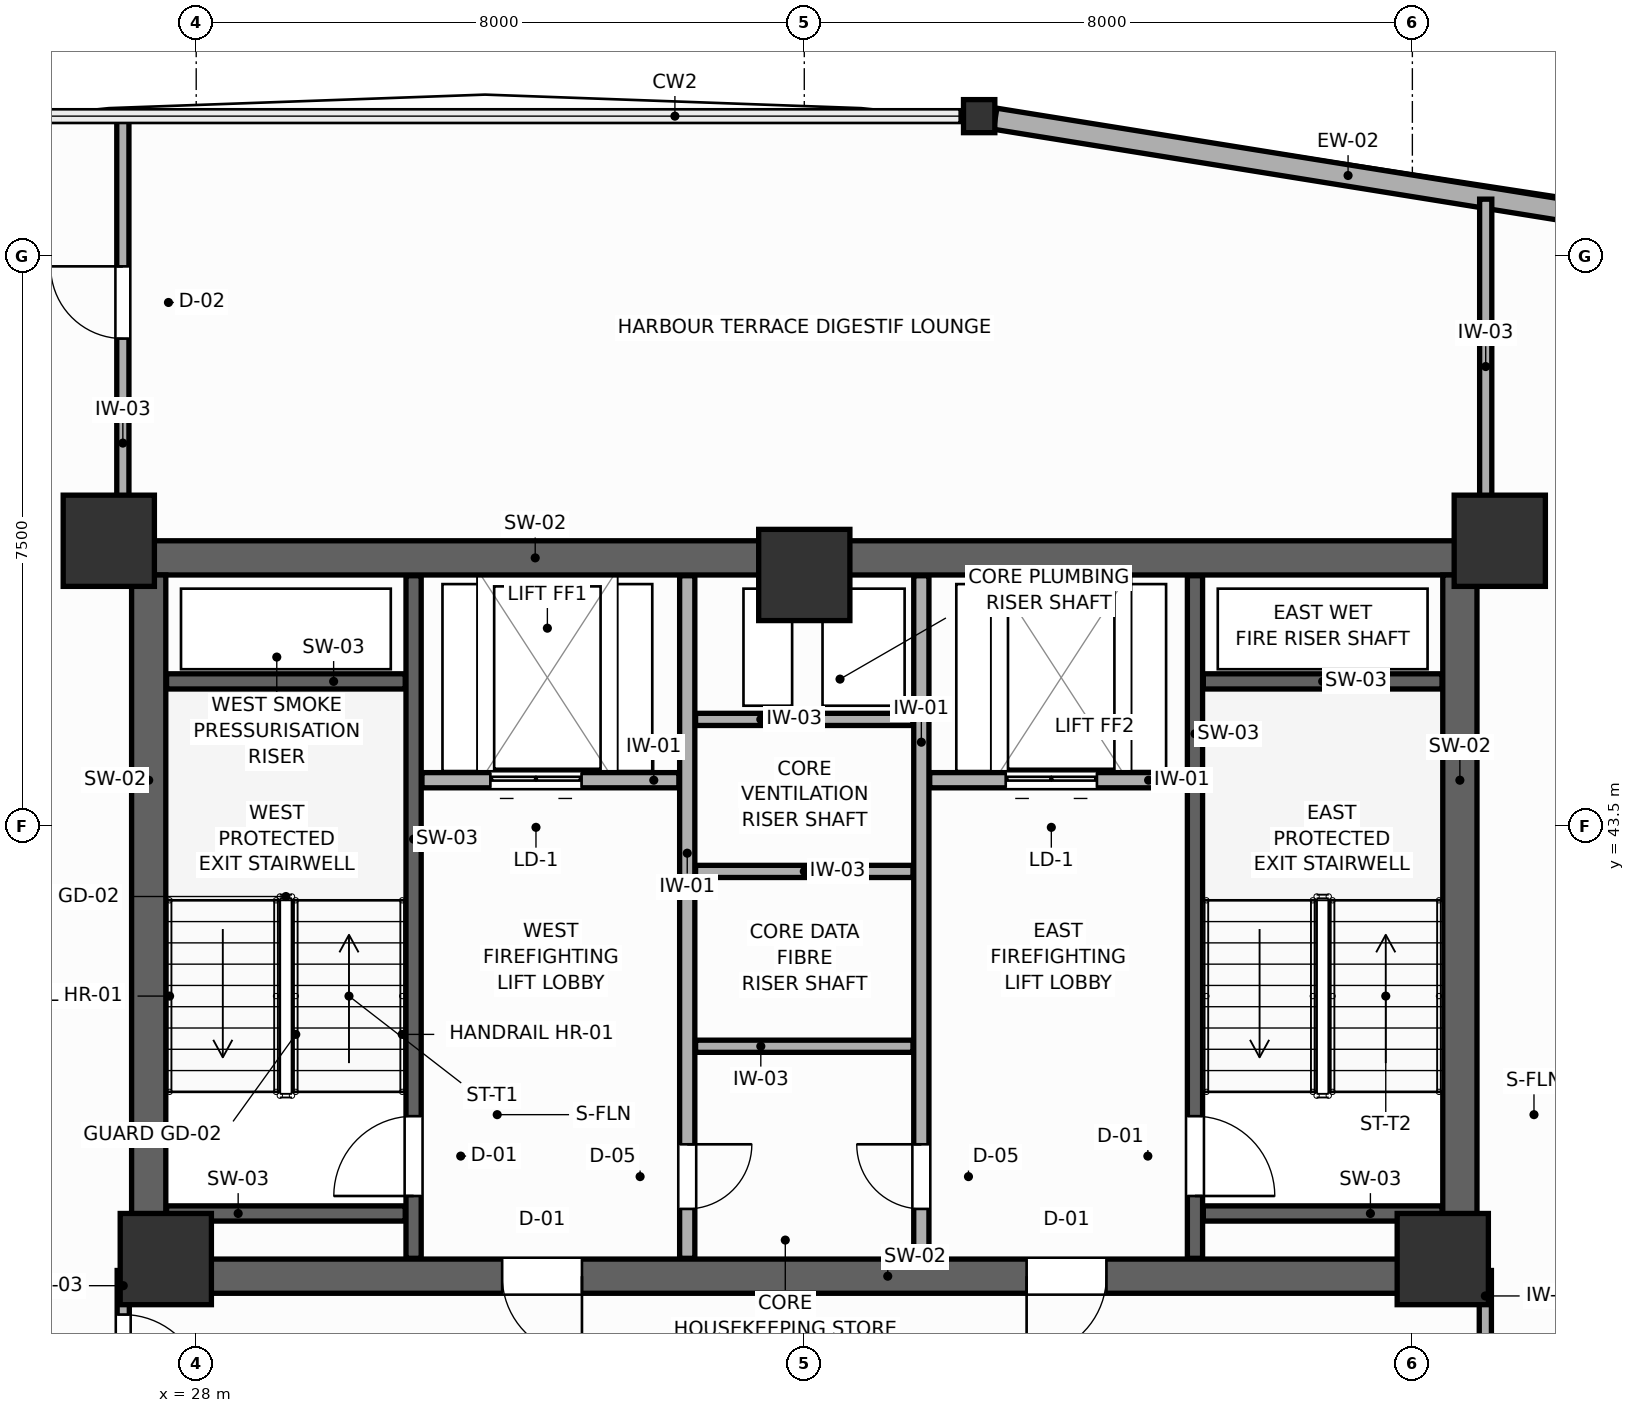
"""IFC4 building model, lengths in metres.
Left out: names, types, materials, properties, quantities, classifications, styles, units other than length and angle.
Written with IfcOpenShell. Run it as: python <this file> out.ifc"""

import sys

from ifc_helpers import new_model, si_unit, direction, frame, frame_2d, origin, origin_2d, place, context, subcontext, project, spatial, rectangle, i_section, extrude, source, transform, mapped, element, fill, save


model = new_model("IFC4")
c1 = context("Model", 3, precision=1e-05, world=origin(), true_north=direction((0.0, 1.0)))
c2 = subcontext(c1, "Body", "Model", "MODEL_VIEW")
j1 = project(units=[si_unit("LENGTHUNIT", "METRE"), si_unit("PLANEANGLEUNIT", "RADIAN")], contexts=[c1])
p1 = place(None, origin())
s1 = spatial("IfcSite", under=j1, at=p1, CompositionType="ELEMENT")
p2 = place(p1, origin())
s2 = spatial("IfcBuilding", under=s1, at=p2, CompositionType="ELEMENT")
p3 = place(p2, frame((0.0, 0.0, 147.0)))
s3 = spatial("IfcBuildingStorey", under=s2, at=p3, CompositionType="ELEMENT", Elevation=147.0)
p4 = place(p3, frame((27.15, 47.025, 0.0), z_axis=(0.0, 0.0, 1.0), x_axis=(1.0, 0.0, 0.0)))
e1 = element("IfcWall", 1, at=p4, inside=s3, PredefinedType="SHEAR", context=c2, shape_type="SweptSolid", body=[
    extrude(rectangle(XDim=17.7, YDim=0.45, at=frame_2d((8.85, 0.0))), origin(), (0.0, 0.0, 1.0), 3.6),
])
p5 = place(p3, frame((27.15, 37.575, 0.0), z_axis=(0.0, 0.0, 1.0), x_axis=(1.0, 0.0, 0.0)))
e2 = element("IfcWall", 2, at=p5, inside=s3, PredefinedType="SHEAR", context=c2, shape_type="SweptSolid", body=[
    extrude(rectangle(XDim=17.7, YDim=0.45, at=frame_2d((8.85, 0.0))), origin(), (0.0, 0.0, 1.0), 3.6),
])
p6 = place(p5, frame((4.875, 0.0, 0.0)))
e3 = element("IfcOpeningElement", 3, at=p6, cuts=e2, PredefinedType="OPENING", context=c2, shape_type="SweptSolid", body=[
    extrude(rectangle(XDim=1.05, YDim=2.1, at=frame_2d((0.525, 1.05))), frame((0.0, 0.235, 0.0), z_axis=(0.0, -1.0, 0.0), x_axis=(1.0, 0.0, 0.0)), (0.0, 0.0, 1.0), 0.47),
])
p7 = place(p5, frame((11.775, 0.0, 0.0)))
e4 = element("IfcOpeningElement", 4, at=p7, cuts=e2, PredefinedType="OPENING", context=c2, shape_type="SweptSolid", body=[
    extrude(rectangle(XDim=1.05, YDim=2.1, at=frame_2d((0.525, 1.05))), frame((0.0, 0.235, 0.0), z_axis=(0.0, -1.0, 0.0), x_axis=(1.0, 0.0, 0.0)), (0.0, 0.0, 1.0), 0.47),
])
for number, where, z_axis, x_axis in (
    (5, (27.375, 37.8, 0.0), (0.0, 0.0, 1.0), (0.0, 1.0, 0.0)),
    (6, (44.625, 37.8, 0.0), (0.0, 0.0, 1.0), (0.0, 1.0, 0.0)),
):
    element("IfcWall", number, at=place(p3, frame(where, z_axis=z_axis, x_axis=x_axis)), inside=s3, PredefinedType="SHEAR", context=c2, shape_type="SweptSolid", body=[
        extrude(rectangle(XDim=9.0, YDim=0.45, at=frame_2d((4.5, 0.0))), origin(), (0.0, 0.0, 1.0), 3.6),
    ])
m1 = source(origin(), c2, "Body", "SweptSolid", [
    extrude(rectangle(XDim=1.2, YDim=1.2, at=origin_2d()), origin(), (0.0, 0.0, 1.0), 3.6),
])
for number, where, z_axis, x_axis in (
    (7, (26.85, 47.25, 0.0), (0.0, 0.0, 1.0), (1.0, 0.0, 0.0)),
    (8, (45.15, 47.25, 0.0), (0.0, 0.0, 1.0), (1.0, 0.0, 0.0)),
    (9, (27.6, 37.8, 0.0), (0.0, 0.0, 1.0), (1.0, 0.0, 0.0)),
    (10, (44.4, 37.8, 0.0), (0.0, 0.0, 1.0), (1.0, 0.0, 0.0)),
    (11, (36.0, 46.8, 0.0), (0.0, 0.0, 1.0), (1.0, 0.0, 0.0)),
):
    element("IfcColumn", number, at=place(p3, frame(where, z_axis=z_axis, x_axis=x_axis)), inside=s3, PredefinedType="COLUMN", context=c2, shape_type="MappedRepresentation", body=[
        mapped(m1, transform((0.0, 0.0, 0.0), scale=1.0)),
    ])
m2 = source(origin(), c2, "Body", "SweptSolid", [
    extrude(i_section(OverallWidth=0.412, OverallDepth=0.435, WebThickness=0.033, FlangeThickness=0.053, FilletRadius=0.015, at=origin_2d()), origin(), (0.0, 0.0, 1.0), 3.6),
])
p8 = place(p3, frame((38.301, 52.836, 0.0), z_axis=(0.0, 0.0, 1.0), x_axis=(1.0, 0.0, 0.0)))
e12 = element("IfcColumn", 12, at=p8, inside=s3, PredefinedType="COLUMN", context=c2, shape_type="MappedRepresentation", body=[
    mapped(m2, transform((0.0, 0.0, 0.0), scale=1.0)),
])
p9 = place(p3, frame((53.07, 50.46, 0.0), z_axis=(0.0, 0.0, 1.0), x_axis=(-0.987303259595, 0.158846698404, 0.0)))
e13 = element("IfcWall", 13, at=p9, inside=s3, PredefinedType="SOLIDWALL", context=c2, shape_type="SweptSolid", body=[
    extrude(rectangle(XDim=14.746, YDim=0.28, at=frame_2d((7.373, 0.0))), origin(), (0.0, 0.0, 1.0), 3.0),
])
p10 = place(p9, frame((3.461, 0.0, 0.75)))
e14 = element("IfcOpeningElement", 14, at=p10, cuts=e13, PredefinedType="OPENING", context=c2, shape_type="SweptSolid", body=[
    extrude(rectangle(XDim=1.7, YDim=1.75, at=frame_2d((0.85, 0.875))), frame((0.0, 0.15, 0.0), z_axis=(0.0, -1.0, 0.0), x_axis=(1.0, 0.0, 0.0)), (0.0, 0.0, 1.0), 0.3),
])
p11 = place(p3, frame((30.86, 37.81, 0.0), z_axis=(0.0, 0.0, 1.0), x_axis=(0.0, 1.0, 0.0)))
e15 = element("IfcWall", 15, at=p11, inside=s3, PredefinedType="SHEAR", context=c2, shape_type="SweptSolid", body=[
    extrude(rectangle(XDim=8.98, YDim=0.2, at=frame_2d((4.49, 0.0))), origin(), (0.0, 0.0, 1.0), 3.6),
])
p12 = place(p11, frame((0.82, 0.0, 0.0)))
e16 = element("IfcOpeningElement", 16, at=p12, cuts=e15, PredefinedType="OPENING", context=c2, shape_type="SweptSolid", body=[
    extrude(rectangle(XDim=1.05, YDim=2.1, at=frame_2d((0.525, 1.05))), frame((0.0, 0.11, 0.0), z_axis=(0.0, -1.0, 0.0), x_axis=(1.0, 0.0, 0.0)), (0.0, 0.0, 1.0), 0.22),
])
for number, where, z_axis, x_axis in (
    (17, (27.61, 45.4, 0.0), (0.0, 0.0, 1.0), (1.0, 0.0, 0.0)),
    (18, (27.61, 38.4, 0.0), (0.0, 0.0, 1.0), (1.0, 0.0, 0.0)),
):
    element("IfcWall", number, at=place(p3, frame(where, z_axis=z_axis, x_axis=x_axis)), inside=s3, PredefinedType="SHEAR", context=c2, shape_type="SweptSolid", body=[
        extrude(rectangle(XDim=3.14, YDim=0.2, at=frame_2d((1.57, 0.0))), origin(), (0.0, 0.0, 1.0), 3.6),
    ])
p13 = place(p3, frame((41.14, 37.81, 0.0), z_axis=(0.0, 0.0, 1.0), x_axis=(0.0, 1.0, 0.0)))
e19 = element("IfcWall", 19, at=p13, inside=s3, PredefinedType="SHEAR", context=c2, shape_type="SweptSolid", body=[
    extrude(rectangle(XDim=8.98, YDim=0.2, at=frame_2d((4.49, 0.0))), origin(), (0.0, 0.0, 1.0), 3.6),
])
p14 = place(p13, frame((0.82, 0.0, 0.0)))
e20 = element("IfcOpeningElement", 20, at=p14, cuts=e19, PredefinedType="OPENING", context=c2, shape_type="SweptSolid", body=[
    extrude(rectangle(XDim=1.05, YDim=2.1, at=frame_2d((0.525, 1.05))), frame((0.0, 0.11, 0.0), z_axis=(0.0, -1.0, 0.0), x_axis=(1.0, 0.0, 0.0)), (0.0, 0.0, 1.0), 0.22),
])
for number, where, z_axis, x_axis in (
    (21, (41.25, 45.4, 0.0), (0.0, 0.0, 1.0), (1.0, 0.0, 0.0)),
    (22, (41.25, 38.4, 0.0), (0.0, 0.0, 1.0), (1.0, 0.0, 0.0)),
):
    element("IfcWall", number, at=place(p3, frame(where, z_axis=z_axis, x_axis=x_axis)), inside=s3, PredefinedType="SHEAR", context=c2, shape_type="SweptSolid", body=[
        extrude(rectangle(XDim=3.14, YDim=0.2, at=frame_2d((1.57, 0.0))), origin(), (0.0, 0.0, 1.0), 3.6),
    ])
p15 = place(p3, frame((30.97, 44.1, 0.0), z_axis=(0.0, 0.0, 1.0), x_axis=(1.0, 0.0, 0.0)))
e23 = element("IfcWall", 23, at=p15, inside=s3, PredefinedType="PARTITIONING", context=c2, shape_type="SweptSolid", body=[
    extrude(rectangle(XDim=3.38, YDim=0.2, at=frame_2d((1.69, 0.0))), origin(), (0.0, 0.0, 1.0), 3.4),
])
p16 = place(p15, frame((0.9, 0.0, 0.0)))
e24 = element("IfcOpeningElement", 24, at=p16, cuts=e23, PredefinedType="OPENING", context=c2, shape_type="SweptSolid", body=[
    extrude(rectangle(XDim=1.2, YDim=2.1, at=frame_2d((0.6, 1.05))), frame((0.0, 0.11, 0.0), z_axis=(0.0, -1.0, 0.0), x_axis=(1.0, 0.0, 0.0)), (0.0, 0.0, 1.0), 0.22),
])
p17 = place(p3, frame((37.65, 44.1, 0.0), z_axis=(0.0, 0.0, 1.0), x_axis=(1.0, 0.0, 0.0)))
e25 = element("IfcWall", 25, at=p17, inside=s3, PredefinedType="PARTITIONING", context=c2, shape_type="SweptSolid", body=[
    extrude(rectangle(XDim=3.38, YDim=0.2, at=frame_2d((1.69, 0.0))), origin(), (0.0, 0.0, 1.0), 3.4),
])
p18 = place(p17, frame((1.0, 0.0, 0.0)))
e26 = element("IfcOpeningElement", 26, at=p18, cuts=e25, PredefinedType="OPENING", context=c2, shape_type="SweptSolid", body=[
    extrude(rectangle(XDim=1.2, YDim=2.1, at=frame_2d((0.6, 1.05))), frame((0.0, 0.11, 0.0), z_axis=(0.0, -1.0, 0.0), x_axis=(1.0, 0.0, 0.0)), (0.0, 0.0, 1.0), 0.22),
])
p19 = place(p3, frame((34.46, 37.81, 0.0), z_axis=(0.0, 0.0, 1.0), x_axis=(0.0, 1.0, 0.0)))
e27 = element("IfcWall", 27, at=p19, inside=s3, PredefinedType="PARTITIONING", context=c2, shape_type="SweptSolid", body=[
    extrude(rectangle(XDim=8.98, YDim=0.2, at=frame_2d((4.49, 0.0))), origin(), (0.0, 0.0, 1.0), 3.4),
])
p20 = place(p19, frame((0.65, 0.0, 0.0)))
e28 = element("IfcOpeningElement", 28, at=p20, cuts=e27, PredefinedType="OPENING", context=c2, shape_type="SweptSolid", body=[
    extrude(rectangle(XDim=0.85, YDim=2.05, at=frame_2d((0.425, 1.025))), frame((0.0, 0.11, 0.0), z_axis=(0.0, -1.0, 0.0), x_axis=(1.0, 0.0, 0.0)), (0.0, 0.0, 1.0), 0.22),
])
p21 = place(p3, frame((37.54, 37.81, 0.0), z_axis=(0.0, 0.0, 1.0), x_axis=(0.0, 1.0, 0.0)))
e29 = element("IfcWall", 29, at=p21, inside=s3, PredefinedType="PARTITIONING", context=c2, shape_type="SweptSolid", body=[
    extrude(rectangle(XDim=8.98, YDim=0.2, at=frame_2d((4.49, 0.0))), origin(), (0.0, 0.0, 1.0), 3.4),
])
p22 = place(p21, frame((0.65, 0.0, 0.0)))
e30 = element("IfcOpeningElement", 30, at=p22, cuts=e29, PredefinedType="OPENING", context=c2, shape_type="SweptSolid", body=[
    extrude(rectangle(XDim=0.85, YDim=2.05, at=frame_2d((0.425, 1.025))), frame((0.0, 0.11, 0.0), z_axis=(0.0, -1.0, 0.0), x_axis=(1.0, 0.0, 0.0)), (0.0, 0.0, 1.0), 0.22),
])
for number, where, z_axis, x_axis in (
    (31, (34.57, 40.6, 0.0), (0.0, 0.0, 1.0), (1.0, 0.0, 0.0)),
    (32, (34.57, 42.9, 0.0), (0.0, 0.0, 1.0), (1.0, 0.0, 0.0)),
    (33, (34.57, 44.9, 0.0), (0.0, 0.0, 1.0), (1.0, 0.0, 0.0)),
):
    element("IfcWall", number, at=place(p3, frame(where, z_axis=z_axis, x_axis=x_axis)), inside=s3, PredefinedType="PARTITIONING", context=c2, shape_type="SweptSolid", body=[
        extrude(rectangle(XDim=2.86, YDim=0.16, at=frame_2d((1.43, 0.0))), origin(), (0.0, 0.0, 1.0), 3.4),
    ])
p23 = place(p3, frame((27.04, 35.54, 0.0), z_axis=(0.0, 0.0, 1.0), x_axis=(0.0, 1.0, 0.0)))
e34 = element("IfcWall", 34, at=p23, inside=s3, PredefinedType="PARTITIONING", context=c2, shape_type="SweptSolid", body=[
    extrude(rectangle(XDim=2.11, YDim=0.16, at=frame_2d((1.055, 0.0))), origin(), (0.0, 0.0, 1.0), 3.4),
])
p24 = place(p23, frame((0.48, 0.0, 0.0)))
e35 = element("IfcOpeningElement", 35, at=p24, cuts=e34, PredefinedType="OPENING", context=c2, shape_type="SweptSolid", body=[
    extrude(rectangle(XDim=1.05, YDim=2.1, at=frame_2d((0.525, 1.05))), frame((0.0, 0.09, 0.0), z_axis=(0.0, -1.0, 0.0), x_axis=(1.0, 0.0, 0.0)), (0.0, 0.0, 1.0), 0.18),
])
p25 = place(p3, frame((44.96, 35.0, 0.0), z_axis=(0.0, 0.0, 1.0), x_axis=(0.0, 1.0, 0.0)))
e36 = element("IfcWall", 36, at=p25, inside=s3, PredefinedType="PARTITIONING", context=c2, shape_type="SweptSolid", body=[
    extrude(rectangle(XDim=2.65, YDim=0.16, at=frame_2d((1.325, 0.0))), origin(), (0.0, 0.0, 1.0), 3.4),
])
p26 = place(p25, frame((0.75, 0.0, 0.0)))
e37 = element("IfcOpeningElement", 37, at=p26, cuts=e36, PredefinedType="OPENING", context=c2, shape_type="SweptSolid", body=[
    extrude(rectangle(XDim=1.05, YDim=2.1, at=frame_2d((0.525, 1.05))), frame((0.0, 0.09, 0.0), z_axis=(0.0, -1.0, 0.0), x_axis=(1.0, 0.0, 0.0)), (0.0, 0.0, 1.0), 0.18),
])
p27 = place(p3, frame((27.035, 47.34, 0.0), z_axis=(0.0, 0.0, 1.0), x_axis=(0.0, 1.0, 0.0)))
e38 = element("IfcWall", 38, at=p27, inside=s3, PredefinedType="PARTITIONING", context=c2, shape_type="SweptSolid", body=[
    extrude(rectangle(XDim=5.476, YDim=0.16, at=frame_2d((2.738, 0.0))), origin(), (0.0, 0.0, 1.0), 3.4),
])
p28 = place(p27, frame((2.57, 0.0, 0.0)))
e39 = element("IfcOpeningElement", 39, at=p28, cuts=e38, PredefinedType="OPENING", context=c2, shape_type="SweptSolid", body=[
    extrude(rectangle(XDim=0.95, YDim=2.05, at=frame_2d((0.475, 1.025))), frame((0.0, 0.09, 0.0), z_axis=(0.0, -1.0, 0.0), x_axis=(1.0, 0.0, 0.0)), (0.0, 0.0, 1.0), 0.18),
])
p29 = place(p3, frame((44.965, 47.34, 0.0), z_axis=(0.0, 0.0, 1.0), x_axis=(0.0, 1.0, 0.0)))
e40 = element("IfcWall", 40, at=p29, inside=s3, PredefinedType="PARTITIONING", context=c2, shape_type="SweptSolid", body=[
    extrude(rectangle(XDim=4.404, YDim=0.16, at=frame_2d((2.202, 0.0))), origin(), (0.0, 0.0, 1.0), 3.4),
])
p30 = place(p12, origin())
e41 = element("IfcDoor", 41, at=p30, inside=s3, OperationType="SINGLE_SWING_LEFT", PredefinedType="DOOR", context=c2, shape_type="SweptSolid", body=[
    extrude(rectangle(XDim=1.05, YDim=2.1, at=frame_2d((0.525, 1.05))), frame((0.0, 0.025, 0.0), z_axis=(0.0, -1.0, 0.0), x_axis=(1.0, 0.0, 0.0)), (0.0, 0.0, 1.0), 0.05),
])
fill(e16, e41)
p31 = place(p14, frame((1.05, 0.0, 0.0), z_axis=(0.0, 0.0, 1.0), x_axis=(-1.0, 0.0, 0.0)))
e42 = element("IfcDoor", 42, at=p31, inside=s3, OperationType="SINGLE_SWING_RIGHT", PredefinedType="DOOR", context=c2, shape_type="SweptSolid", body=[
    extrude(rectangle(XDim=1.05, YDim=2.1, at=frame_2d((0.525, 1.05))), frame((0.0, 0.025, 0.0), z_axis=(0.0, -1.0, 0.0), x_axis=(1.0, 0.0, 0.0)), (0.0, 0.0, 1.0), 0.05),
])
fill(e20, e42)
p32 = place(p16, origin())
e43 = element("IfcDoor", 43, at=p32, inside=s3, OperationType="DOUBLE_DOOR_SLIDING", PredefinedType="DOOR", context=c2, shape_type="SweptSolid", body=[
    extrude(rectangle(XDim=1.2, YDim=2.1, at=frame_2d((0.6, 1.05))), frame((0.0, 0.025, 0.0), z_axis=(0.0, -1.0, 0.0), x_axis=(1.0, 0.0, 0.0)), (0.0, 0.0, 1.0), 0.05),
])
fill(e24, e43)
p33 = place(p18, origin())
e44 = element("IfcDoor", 44, at=p33, inside=s3, OperationType="DOUBLE_DOOR_SLIDING", PredefinedType="DOOR", context=c2, shape_type="SweptSolid", body=[
    extrude(rectangle(XDim=1.2, YDim=2.1, at=frame_2d((0.6, 1.05))), frame((0.0, 0.025, 0.0), z_axis=(0.0, -1.0, 0.0), x_axis=(1.0, 0.0, 0.0)), (0.0, 0.0, 1.0), 0.05),
])
fill(e26, e44)
p34 = place(p20, frame((0.85, 0.0, 0.0), z_axis=(0.0, 0.0, 1.0), x_axis=(-1.0, 0.0, 0.0)))
e45 = element("IfcDoor", 45, at=p34, inside=s3, OperationType="SINGLE_SWING_LEFT", PredefinedType="DOOR", context=c2, shape_type="SweptSolid", body=[
    extrude(rectangle(XDim=0.85, YDim=2.05, at=frame_2d((0.425, 1.025))), frame((0.0, 0.025, 0.0), z_axis=(0.0, -1.0, 0.0), x_axis=(1.0, 0.0, 0.0)), (0.0, 0.0, 1.0), 0.05),
])
fill(e28, e45)
p35 = place(p22, origin())
e46 = element("IfcDoor", 46, at=p35, inside=s3, OperationType="SINGLE_SWING_RIGHT", PredefinedType="DOOR", context=c2, shape_type="SweptSolid", body=[
    extrude(rectangle(XDim=0.85, YDim=2.05, at=frame_2d((0.425, 1.025))), frame((0.0, 0.025, 0.0), z_axis=(0.0, -1.0, 0.0), x_axis=(1.0, 0.0, 0.0)), (0.0, 0.0, 1.0), 0.05),
])
fill(e30, e46)
p36 = place(p24, frame((1.05, 0.0, 0.0), z_axis=(0.0, 0.0, 1.0), x_axis=(-1.0, 0.0, 0.0)))
e47 = element("IfcDoor", 47, at=p36, inside=s3, OperationType="SINGLE_SWING_RIGHT", PredefinedType="DOOR", context=c2, shape_type="SweptSolid", body=[
    extrude(rectangle(XDim=1.05, YDim=2.1, at=frame_2d((0.525, 1.05))), frame((0.0, 0.025, 0.0), z_axis=(0.0, -1.0, 0.0), x_axis=(1.0, 0.0, 0.0)), (0.0, 0.0, 1.0), 0.05),
])
fill(e35, e47)
p37 = place(p28, origin())
e48 = element("IfcDoor", 48, at=p37, inside=s3, OperationType="SINGLE_SWING_RIGHT", PredefinedType="DOOR", context=c2, shape_type="SweptSolid", body=[
    extrude(rectangle(XDim=0.95, YDim=2.05, at=frame_2d((0.475, 1.025))), frame((0.0, 0.025, 0.0), z_axis=(0.0, -1.0, 0.0), x_axis=(1.0, 0.0, 0.0)), (0.0, 0.0, 1.0), 0.05),
])
fill(e39, e48)
p38 = place(p6, frame((1.05, 0.0, 0.0), z_axis=(0.0, 0.0, 1.0), x_axis=(-1.0, 0.0, 0.0)))
e49 = element("IfcDoor", 49, at=p38, inside=s3, OperationType="SINGLE_SWING_LEFT", PredefinedType="DOOR", context=c2, shape_type="SweptSolid", body=[
    extrude(rectangle(XDim=1.05, YDim=2.1, at=frame_2d((0.525, 1.05))), frame((0.0, 0.025, 0.0), z_axis=(0.0, -1.0, 0.0), x_axis=(1.0, 0.0, 0.0)), (0.0, 0.0, 1.0), 0.05),
])
fill(e3, e49)
p39 = place(p7, frame((1.05, 0.0, 0.0), z_axis=(0.0, 0.0, 1.0), x_axis=(-1.0, 0.0, 0.0)))
e50 = element("IfcDoor", 50, at=p39, inside=s3, OperationType="SINGLE_SWING_RIGHT", PredefinedType="DOOR", context=c2, shape_type="SweptSolid", body=[
    extrude(rectangle(XDim=1.05, YDim=2.1, at=frame_2d((0.525, 1.05))), frame((0.0, 0.025, 0.0), z_axis=(0.0, -1.0, 0.0), x_axis=(1.0, 0.0, 0.0)), (0.0, 0.0, 1.0), 0.05),
])
fill(e4, e50)
save(model, sys.argv[1])
